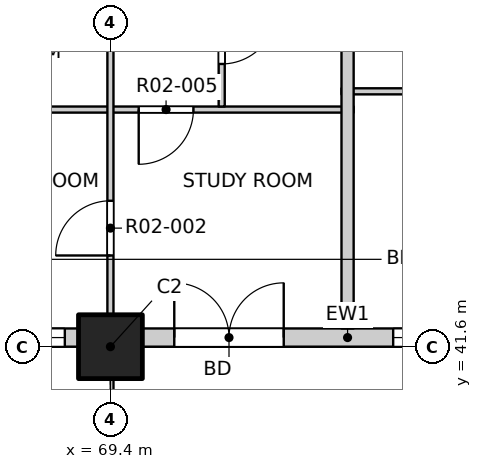
"""IFC4 building model, lengths in metres.
Left out: names, types, materials, properties, quantities, classifications, styles, units other than length and angle.
Written with IfcOpenShell. Run it as: python <this file> out.ifc"""

import sys

from ifc_helpers import new_model, si_unit, direction, frame, frame_2d, origin, origin_2d, place, context, subcontext, project, spatial, rectangle, extrude, element, fill, save


model = new_model("IFC4")
c1 = context("Model", 3, precision=1e-05, world=origin(), true_north=direction((0.0, 1.0)))
c2 = subcontext(c1, "Body", "Model", "MODEL_VIEW")
j1 = project(units=[si_unit("LENGTHUNIT", "METRE"), si_unit("PLANEANGLEUNIT", "RADIAN")], contexts=[c1])
p1 = place(None, origin())
s1 = spatial("IfcSite", under=j1, at=p1, CompositionType="ELEMENT")
p2 = place(p1, origin())
s2 = spatial("IfcBuilding", under=s1, at=p2, CompositionType="ELEMENT")
p3 = place(p2, frame((0.0, 0.0, 29.7)))
s3 = spatial("IfcBuildingStorey", under=s2, at=p3, CompositionType="ELEMENT", Elevation=29.7)
p4 = place(p3, frame((69.4, 41.6, -0.25), z_axis=(0.0, 0.0, 1.0), x_axis=(1.0, 0.0, 0.0)))
e1 = element("IfcColumn", 1, at=p4, inside=s3, PredefinedType="COLUMN", context=c2, shape_type="SweptSolid", body=[
    extrude(rectangle(XDim=1.05, YDim=1.05, at=origin_2d()), origin(), (0.0, 0.0, 1.0), 3.4),
])
p5 = place(p3, frame((65.5, 41.75, 0.0), z_axis=(0.0, 0.0, 1.0), x_axis=(1.0, 0.0, 0.0)))
e2 = element("IfcWall", 2, at=p5, inside=s3, PredefinedType="SOLIDWALL", context=c2, shape_type="SweptSolid", body=[
    extrude(rectangle(XDim=3.375, YDim=0.3, at=frame_2d((1.688, 0.0))), origin(), (0.0, 0.0, 1.0), 2.7),
])
p6 = place(p5, frame((0.75, 0.0, 0.9)))
e3 = element("IfcOpeningElement", 3, at=p6, cuts=e2, PredefinedType="OPENING", context=c2, shape_type="SweptSolid", body=[
    extrude(rectangle(XDim=2.4, YDim=1.8, at=frame_2d((1.2, 0.9))), frame((0.0, 0.16, 0.0), z_axis=(0.0, -1.0, 0.0), x_axis=(1.0, 0.0, 0.0)), (0.0, 0.0, 1.0), 0.32),
])
p7 = place(p3, frame((69.925, 41.75, 0.0), z_axis=(0.0, 0.0, 1.0), x_axis=(1.0, 0.0, 0.0)))
e4 = element("IfcWall", 4, at=p7, inside=s3, PredefinedType="SOLIDWALL", context=c2, shape_type="SweptSolid", body=[
    extrude(rectangle(XDim=6.75, YDim=0.3, at=frame_2d((3.375, 0.0))), origin(), (0.0, 0.0, 1.0), 2.7),
])
p8 = place(p7, frame((0.525, 0.0, 0.0)))
e5 = element("IfcOpeningElement", 5, at=p8, cuts=e4, PredefinedType="OPENING", context=c2, shape_type="SweptSolid", body=[
    extrude(rectangle(XDim=1.8, YDim=2.4, at=frame_2d((0.9, 1.2))), frame((0.0, 0.16, 0.0), z_axis=(0.0, -1.0, 0.0), x_axis=(1.0, 0.0, 0.0)), (0.0, 0.0, 1.0), 0.32),
])
p9 = place(p7, frame((4.125, 0.0, 0.9)))
e6 = element("IfcOpeningElement", 6, at=p9, cuts=e4, PredefinedType="OPENING", context=c2, shape_type="SweptSolid", body=[
    extrude(rectangle(XDim=2.4, YDim=1.8, at=frame_2d((1.2, 0.9))), frame((0.0, 0.16, 0.0), z_axis=(0.0, -1.0, 0.0), x_axis=(1.0, 0.0, 0.0)), (0.0, 0.0, 1.0), 0.32),
])
p10 = place(p3, frame((61.9, 45.5, 0.0), z_axis=(0.0, 0.0, 1.0), x_axis=(1.0, 0.0, 0.0)))
e7 = element("IfcWall", 7, at=p10, inside=s3, PredefinedType="PARTITIONING", context=c2, shape_type="SweptSolid", body=[
    extrude(rectangle(XDim=11.5, YDim=0.1, at=frame_2d((5.75, 0.0))), origin(), (0.0, 0.0, 1.0), 3.15),
])
p11 = place(p10, frame((7.965, 0.0, 0.0)))
e8 = element("IfcOpeningElement", 8, at=p11, cuts=e7, PredefinedType="OPENING", context=c2, shape_type="SweptSolid", body=[
    extrude(rectangle(XDim=0.9, YDim=2.1, at=frame_2d((0.45, 1.05))), frame((0.0, 0.06, 0.0), z_axis=(0.0, -1.0, 0.0), x_axis=(1.0, 0.0, 0.0)), (0.0, 0.0, 1.0), 0.12),
])
p12 = place(p3, frame((73.2, 45.8, 0.0), z_axis=(0.0, 0.0, 1.0), x_axis=(1.0, 0.0, 0.0)))
e9 = element("IfcWall", 9, at=p12, inside=s3, PredefinedType="PARTITIONING", context=c2, shape_type="SweptSolid", body=[
    extrude(rectangle(XDim=8.0, YDim=0.1, at=frame_2d((4.0, 0.0))), origin(), (0.0, 0.0, 1.0), 3.15),
])
p13 = place(p12, frame((1.45, 0.0, 0.0)))
e10 = element("IfcOpeningElement", 10, at=p13, cuts=e9, PredefinedType="OPENING", context=c2, shape_type="SweptSolid", body=[
    extrude(rectangle(XDim=1.2, YDim=2.1, at=frame_2d((0.6, 1.05))), frame((0.0, 0.06, 0.0), z_axis=(0.0, -1.0, 0.0), x_axis=(1.0, 0.0, 0.0)), (0.0, 0.0, 1.0), 0.12),
])
p14 = place(p12, frame((4.525, 0.0, 0.0)))
e11 = element("IfcOpeningElement", 11, at=p14, cuts=e9, PredefinedType="OPENING", context=c2, shape_type="SweptSolid", body=[
    extrude(rectangle(XDim=0.9, YDim=2.1, at=frame_2d((0.45, 1.05))), frame((0.0, 0.06, 0.0), z_axis=(0.0, -1.0, 0.0), x_axis=(1.0, 0.0, 0.0)), (0.0, 0.0, 1.0), 0.12),
])
p15 = place(p12, frame((6.475, 0.0, 0.0)))
e12 = element("IfcOpeningElement", 12, at=p15, cuts=e9, PredefinedType="OPENING", context=c2, shape_type="SweptSolid", body=[
    extrude(rectangle(XDim=0.9, YDim=2.1, at=frame_2d((0.45, 1.05))), frame((0.0, 0.06, 0.0), z_axis=(0.0, -1.0, 0.0), x_axis=(1.0, 0.0, 0.0)), (0.0, 0.0, 1.0), 0.12),
])
p16 = place(p3, frame((69.4, 41.9, 0.0), z_axis=(0.0, 0.0, 1.0), x_axis=(0.0, 1.0, 0.0)))
e13 = element("IfcWall", 13, at=p16, inside=s3, PredefinedType="PARTITIONING", context=c2, shape_type="SweptSolid", body=[
    extrude(rectangle(XDim=7.5, YDim=0.1, at=frame_2d((3.75, 0.0))), origin(), (0.0, 0.0, 1.0), 2.55),
])
p17 = place(p16, frame((1.2, 0.0, 0.0)))
e14 = element("IfcOpeningElement", 14, at=p17, cuts=e13, PredefinedType="OPENING", context=c2, shape_type="SweptSolid", body=[
    extrude(rectangle(XDim=0.9, YDim=2.1, at=frame_2d((0.45, 1.05))), frame((0.0, 0.06, 0.0), z_axis=(0.0, -1.0, 0.0), x_axis=(1.0, 0.0, 0.0)), (0.0, 0.0, 1.0), 0.12),
])
p18 = place(p16, frame((5.1, 0.0, 0.0)))
e15 = element("IfcOpeningElement", 15, at=p18, cuts=e13, PredefinedType="OPENING", context=c2, shape_type="SweptSolid", body=[
    extrude(rectangle(XDim=0.9, YDim=2.1, at=frame_2d((0.45, 1.05))), frame((0.0, 0.06, 0.0), z_axis=(0.0, -1.0, 0.0), x_axis=(1.0, 0.0, 0.0)), (0.0, 0.0, 1.0), 0.12),
])
p19 = place(p3, frame((71.23, 45.55, 0.0), z_axis=(0.0, 0.0, 1.0), x_axis=(0.0, 1.0, 0.0)))
e16 = element("IfcWall", 16, at=p19, inside=s3, PredefinedType="PARTITIONING", context=c2, shape_type="SweptSolid", body=[
    extrude(rectangle(XDim=9.2, YDim=0.1, at=frame_2d((4.6, 0.0))), origin(), (0.0, 0.0, 1.0), 3.15),
])
p20 = place(p19, frame((0.7, 0.0, 0.0)))
e17 = element("IfcOpeningElement", 17, at=p20, cuts=e16, PredefinedType="OPENING", context=c2, shape_type="SweptSolid", body=[
    extrude(rectangle(XDim=0.9, YDim=2.1, at=frame_2d((0.45, 1.05))), frame((0.0, 0.06, 0.0), z_axis=(0.0, -1.0, 0.0), x_axis=(1.0, 0.0, 0.0)), (0.0, 0.0, 1.0), 0.12),
])
p21 = place(p19, frame((3.1, 0.0, 0.0)))
e18 = element("IfcOpeningElement", 18, at=p21, cuts=e16, PredefinedType="OPENING", context=c2, shape_type="SweptSolid", body=[
    extrude(rectangle(XDim=0.8, YDim=2.1, at=frame_2d((0.4, 1.05))), frame((0.0, 0.06, 0.0), z_axis=(0.0, -1.0, 0.0), x_axis=(1.0, 0.0, 0.0)), (0.0, 0.0, 1.0), 0.12),
])
p22 = place(p19, frame((5.4, 0.0, 0.0)))
e19 = element("IfcOpeningElement", 19, at=p22, cuts=e16, PredefinedType="OPENING", context=c2, shape_type="SweptSolid", body=[
    extrude(rectangle(XDim=0.8, YDim=2.1, at=frame_2d((0.4, 1.05))), frame((0.0, 0.06, 0.0), z_axis=(0.0, -1.0, 0.0), x_axis=(1.0, 0.0, 0.0)), (0.0, 0.0, 1.0), 0.12),
])
p23 = place(p19, frame((7.7, 0.0, 0.0)))
e20 = element("IfcOpeningElement", 20, at=p23, cuts=e16, PredefinedType="OPENING", context=c2, shape_type="SweptSolid", body=[
    extrude(rectangle(XDim=0.8, YDim=2.1, at=frame_2d((0.4, 1.05))), frame((0.0, 0.06, 0.0), z_axis=(0.0, -1.0, 0.0), x_axis=(1.0, 0.0, 0.0)), (0.0, 0.0, 1.0), 0.12),
])
p24 = place(p3, frame((73.3, 41.9, 0.0), z_axis=(0.0, 0.0, 1.0), x_axis=(0.0, 1.0, 0.0)))
e21 = element("IfcWall", 21, at=p24, inside=s3, PredefinedType="PARTITIONING", context=c2, shape_type="SweptSolid", body=[
    extrude(rectangle(XDim=11.3, YDim=0.2, at=frame_2d((5.65, 0.0))), origin(), (0.0, 0.0, 1.0), 3.15),
])
p25 = place(p6, origin())
e22 = element("IfcWindow", 22, at=p25, inside=s3, PartitioningType="DOUBLE_PANEL_VERTICAL", PredefinedType="WINDOW", context=c2, shape_type="SweptSolid", body=[
    extrude(rectangle(XDim=2.4, YDim=1.8, at=frame_2d((1.2, 0.9))), frame((0.0, 0.03, 0.0), z_axis=(0.0, -1.0, 0.0), x_axis=(1.0, 0.0, 0.0)), (0.0, 0.0, 1.0), 0.06),
])
fill(e3, e22)
p26 = place(p8, origin())
e23 = element("IfcDoor", 23, at=p26, inside=s3, OperationType="DOUBLE_DOOR_SINGLE_SWING", PredefinedType="DOOR", context=c2, shape_type="SweptSolid", body=[
    extrude(rectangle(XDim=1.8, YDim=2.4, at=frame_2d((0.9, 1.2))), frame((0.0, 0.025, 0.0), z_axis=(0.0, -1.0, 0.0), x_axis=(1.0, 0.0, 0.0)), (0.0, 0.0, 1.0), 0.05),
])
fill(e5, e23)
p27 = place(p9, origin())
e24 = element("IfcWindow", 24, at=p27, inside=s3, PartitioningType="DOUBLE_PANEL_VERTICAL", PredefinedType="WINDOW", context=c2, shape_type="SweptSolid", body=[
    extrude(rectangle(XDim=2.4, YDim=1.8, at=frame_2d((1.2, 0.9))), frame((0.0, 0.03, 0.0), z_axis=(0.0, -1.0, 0.0), x_axis=(1.0, 0.0, 0.0)), (0.0, 0.0, 1.0), 0.06),
])
fill(e6, e24)
p28 = place(p17, origin())
e25 = element("IfcDoor", 25, at=p28, inside=s3, OperationType="SINGLE_SWING_LEFT", PredefinedType="DOOR", context=c2, shape_type="SweptSolid", body=[
    extrude(rectangle(XDim=0.9, YDim=2.1, at=frame_2d((0.45, 1.05))), frame((0.0, 0.025, 0.0), z_axis=(0.0, -1.0, 0.0), x_axis=(1.0, 0.0, 0.0)), (0.0, 0.0, 1.0), 0.05),
])
fill(e14, e25)
p29 = place(p11, origin())
e26 = element("IfcDoor", 26, at=p29, inside=s3, OperationType="SINGLE_SWING_RIGHT", PredefinedType="DOOR", context=c2, shape_type="SweptSolid", body=[
    extrude(rectangle(XDim=0.9, YDim=2.1, at=frame_2d((0.45, 1.05))), frame((0.0, 0.025, 0.0), z_axis=(0.0, -1.0, 0.0), x_axis=(1.0, 0.0, 0.0)), (0.0, 0.0, 1.0), 0.05),
])
fill(e8, e26)
p30 = place(p20, origin())
e27 = element("IfcDoor", 27, at=p30, inside=s3, OperationType="SINGLE_SWING_LEFT", PredefinedType="DOOR", context=c2, shape_type="SweptSolid", body=[
    extrude(rectangle(XDim=0.9, YDim=2.1, at=frame_2d((0.45, 1.05))), frame((0.0, 0.025, 0.0), z_axis=(0.0, -1.0, 0.0), x_axis=(1.0, 0.0, 0.0)), (0.0, 0.0, 1.0), 0.05),
])
fill(e17, e27)
save(model, sys.argv[1])
